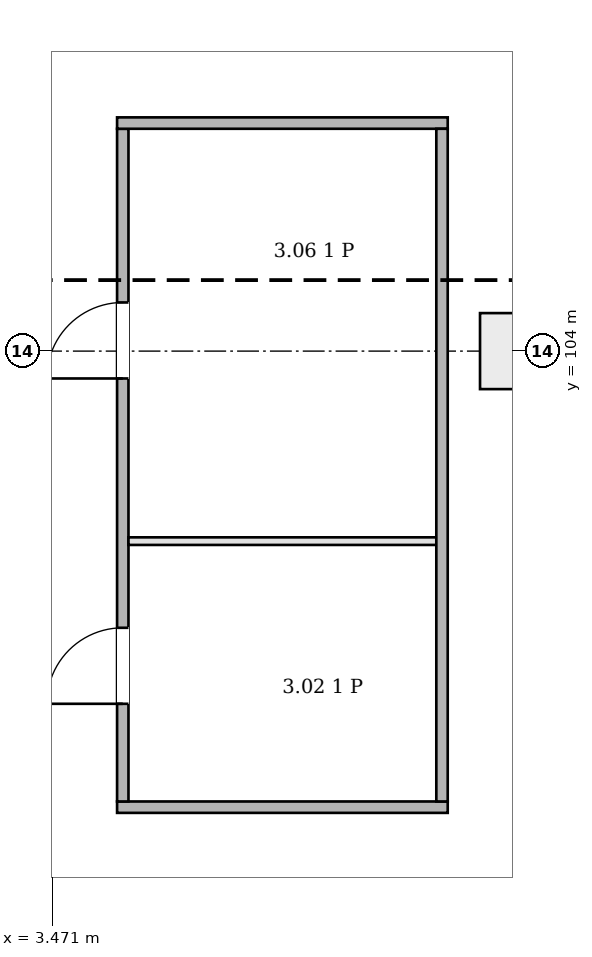
"""IFC4 building model, lengths in metres.
Left out: names, types, materials, properties, quantities, classifications, styles, units other than length and angle.
Written with IfcOpenShell. Run it as: python <this file> out.ifc"""

import sys

from ifc_helpers import new_model, si_unit, direction, frame, frame_2d, origin, origin_2d, place, context, subcontext, project, spatial, rectangle, extrude, element, fill, save


model = new_model("IFC4")
c1 = context("Model", 3, precision=1e-05, world=origin(), true_north=direction((0.0, 1.0)))
c2 = subcontext(c1, "Body", "Model", "MODEL_VIEW")
j1 = project(units=[si_unit("LENGTHUNIT", "METRE"), si_unit("PLANEANGLEUNIT", "RADIAN")], contexts=[c1])
p1 = place(None, origin())
s1 = spatial("IfcSite", under=j1, at=p1, CompositionType="ELEMENT")
p2 = place(p1, origin())
s2 = spatial("IfcBuilding", under=s1, at=p2, CompositionType="ELEMENT")
p3 = place(p2, frame((0.0, 0.0, 21.7)))
s3 = spatial("IfcBuildingStorey", under=s2, at=p3, CompositionType="ELEMENT", Elevation=21.7)
p4 = place(p3, frame((9.6, 104.0, 0.0), z_axis=(0.0, 0.0, 1.0), x_axis=(1.0, 0.0, 0.0)))
e1 = element("IfcColumn", 1, at=p4, inside=s3, PredefinedType="COLUMN", context=c2, shape_type="SweptSolid", body=[
    extrude(rectangle(XDim=1.0, YDim=1.0, at=origin_2d()), origin(), (0.0, 0.0, 1.0), 5.0),
])
p5 = place(p3, frame((4.325, 98.0, 0.0), z_axis=(0.0, 0.0, 1.0), x_axis=(1.0, 0.0, 0.0)))
e2 = element("IfcWall", 2, at=p5, inside=s3, PredefinedType="PARTITIONING", context=c2, shape_type="SweptSolid", body=[
    extrude(rectangle(XDim=4.35, YDim=0.15, at=frame_2d((2.175, 0.0))), origin(), (0.0, 0.0, 1.0), 4.65),
])
p6 = place(p3, frame((4.4, 98.075, 0.0), z_axis=(0.0, 0.0, 1.0), x_axis=(0.0, 1.0, 0.0)))
e3 = element("IfcWall", 3, at=p6, inside=s3, PredefinedType="PARTITIONING", context=c2, shape_type="SweptSolid", body=[
    extrude(rectangle(XDim=8.85, YDim=0.15, at=frame_2d((4.425, 0.0))), origin(), (0.0, 0.0, 1.0), 4.65),
])
p7 = place(p6, frame((1.285, 0.0, 0.0)))
e4 = element("IfcOpeningElement", 4, at=p7, cuts=e3, PredefinedType="OPENING", context=c2, shape_type="SweptSolid", body=[
    extrude(rectangle(XDim=1.0, YDim=2.1, at=frame_2d((0.5, 1.05))), frame((0.0, 0.085, 0.0), z_axis=(0.0, -1.0, 0.0), x_axis=(1.0, 0.0, 0.0)), (0.0, 0.0, 1.0), 0.17),
])
p8 = place(p6, frame((5.565, 0.0, 0.0)))
e5 = element("IfcOpeningElement", 5, at=p8, cuts=e3, PredefinedType="OPENING", context=c2, shape_type="SweptSolid", body=[
    extrude(rectangle(XDim=1.0, YDim=2.1, at=frame_2d((0.5, 1.05))), frame((0.0, 0.085, 0.0), z_axis=(0.0, -1.0, 0.0), x_axis=(1.0, 0.0, 0.0)), (0.0, 0.0, 1.0), 0.17),
])
p9 = place(p3, frame((4.325, 107.0, 0.0), z_axis=(0.0, 0.0, 1.0), x_axis=(1.0, 0.0, 0.0)))
e6 = element("IfcWall", 6, at=p9, inside=s3, PredefinedType="PARTITIONING", context=c2, shape_type="SweptSolid", body=[
    extrude(rectangle(XDim=4.35, YDim=0.15, at=frame_2d((2.175, 0.0))), origin(), (0.0, 0.0, 1.0), 4.65),
])
p10 = place(p3, frame((4.475, 101.5, 0.0), z_axis=(0.0, 0.0, 1.0), x_axis=(1.0, 0.0, 0.0)))
e7 = element("IfcWall", 7, at=p10, inside=s3, PredefinedType="PARTITIONING", context=c2, shape_type="SweptSolid", body=[
    extrude(rectangle(XDim=4.05, YDim=0.1, at=frame_2d((2.025, 0.0))), origin(), (0.0, 0.0, 1.0), 4.65),
])
p11 = place(p3, frame((8.6, 98.075, 0.0), z_axis=(0.0, 0.0, 1.0), x_axis=(0.0, 1.0, 0.0)))
e8 = element("IfcWall", 8, at=p11, inside=s3, PredefinedType="PARTITIONING", context=c2, shape_type="SweptSolid", body=[
    extrude(rectangle(XDim=8.85, YDim=0.15, at=frame_2d((4.425, 0.0))), origin(), (0.0, 0.0, 1.0), 4.65),
])
p12 = place(p7, origin())
e9 = element("IfcDoor", 9, at=p12, inside=s3, OperationType="SINGLE_SWING_RIGHT", PredefinedType="DOOR", context=c2, shape_type="SweptSolid", body=[
    extrude(rectangle(XDim=1.0, YDim=2.1, at=frame_2d((0.5, 1.05))), frame((0.0, 0.025, 0.0), z_axis=(0.0, -1.0, 0.0), x_axis=(1.0, 0.0, 0.0)), (0.0, 0.0, 1.0), 0.05),
])
fill(e4, e9)
p13 = place(p8, origin())
e10 = element("IfcDoor", 10, at=p13, inside=s3, OperationType="SINGLE_SWING_LEFT", PredefinedType="DOOR", context=c2, shape_type="SweptSolid", body=[
    extrude(rectangle(XDim=1.0, YDim=2.1, at=frame_2d((0.5, 1.05))), frame((0.0, 0.025, 0.0), z_axis=(0.0, -1.0, 0.0), x_axis=(1.0, 0.0, 0.0)), (0.0, 0.0, 1.0), 0.05),
])
fill(e5, e10)
save(model, sys.argv[1])
